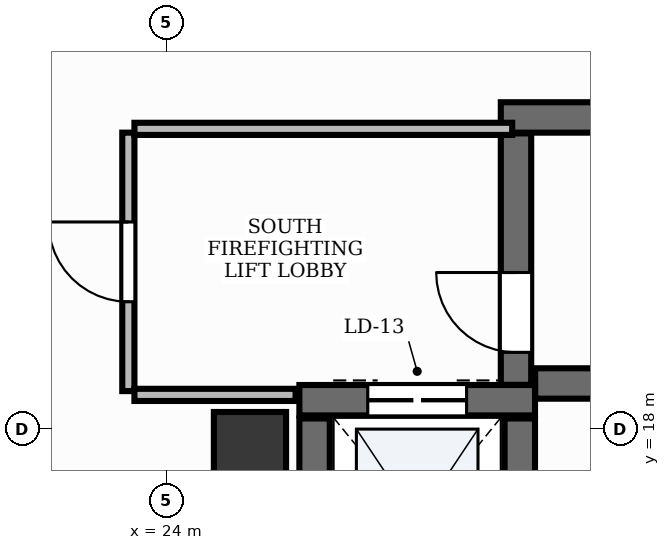
"""IFC4 building model, lengths in metres.
Left out: names, types, materials, properties, quantities, classifications, styles, units other than length and angle.
Written with IfcOpenShell. Run it as: python <this file> out.ifc"""

import sys

from ifc_helpers import new_model, si_unit, direction, frame, frame_2d, origin, origin_2d, place, context, subcontext, project, spatial, rectangle, extrude, element, fill, save


model = new_model("IFC4")
c1 = context("Model", 3, precision=1e-05, world=origin(), true_north=direction((0.0, 1.0)))
c2 = subcontext(c1, "Body", "Model", "MODEL_VIEW")
j1 = project(units=[si_unit("LENGTHUNIT", "METRE"), si_unit("PLANEANGLEUNIT", "RADIAN")], contexts=[c1])
p1 = place(None, origin())
s1 = spatial("IfcSite", under=j1, at=p1, CompositionType="ELEMENT")
p2 = place(p1, origin())
s2 = spatial("IfcBuilding", under=s1, at=p2, CompositionType="ELEMENT")
p3 = place(p2, frame((0.0, 0.0, 179.4)))
s3 = spatial("IfcBuildingStorey", under=s2, at=p3, CompositionType="ELEMENT", Elevation=179.4)
p4 = place(p3, frame((28.852, 18.6, 0.0), z_axis=(0.0, 0.0, 1.0), x_axis=(1.0, 0.0, 0.0)))
e1 = element("IfcWall", 1, at=p4, inside=s3, PredefinedType="SHEAR", context=c2, shape_type="SweptSolid", body=[
    extrude(rectangle(XDim=8.198, YDim=0.4, at=frame_2d((4.099, 0.0))), origin(), (0.0, 0.0, 1.0), 3.9),
])
p5 = place(p3, frame((28.4, 22.1, 0.0), z_axis=(0.0, 0.0, 1.0), x_axis=(1.0, 0.0, 0.0)))
e2 = element("IfcWall", 2, at=p5, inside=s3, PredefinedType="SHEAR", context=c2, shape_type="SweptSolid", body=[
    extrude(rectangle(XDim=8.65, YDim=0.4, at=frame_2d((4.325, 0.0))), origin(), (0.0, 0.0, 1.0), 3.9),
])
p6 = place(p3, frame((28.6, 18.582, 0.0), z_axis=(0.0, 0.0, 1.0), x_axis=(0.0, 1.0, 0.0)))
e3 = element("IfcWall", 3, at=p6, inside=s3, PredefinedType="SHEAR", context=c2, shape_type="SweptSolid", body=[
    extrude(rectangle(XDim=3.308, YDim=0.4, at=frame_2d((1.654, 0.0))), origin(), (0.0, 0.0, 1.0), 3.9),
])
p7 = place(p6, frame((0.428, 0.0, 0.0)))
e4 = element("IfcOpeningElement", 4, at=p7, cuts=e3, PredefinedType="OPENING", context=c2, shape_type="SweptSolid", body=[
    extrude(rectangle(XDim=1.05, YDim=2.15, at=frame_2d((0.525, 1.075))), frame((0.0, 0.215, 0.0), z_axis=(0.0, -1.0, 0.0), x_axis=(1.0, 0.0, 0.0)), (0.0, 0.0, 1.0), 0.43),
])
p8 = place(p3, frame((25.75, 18.38, 0.0), z_axis=(0.0, 0.0, 1.0), x_axis=(1.0, 0.0, 0.0)))
e5 = element("IfcWall", 5, at=p8, inside=s3, PredefinedType="SHEAR", context=c2, shape_type="SweptSolid", body=[
    extrude(rectangle(XDim=3.1, YDim=0.4, at=frame_2d((1.55, 0.0))), origin(), (0.0, 0.0, 1.0), 3.9),
])
p9 = place(p8, frame((0.9, 0.0, 0.0)))
e6 = element("IfcOpeningElement", 6, at=p9, cuts=e5, PredefinedType="OPENING", context=c2, shape_type="SweptSolid", body=[
    extrude(rectangle(XDim=1.3, YDim=2.2, at=frame_2d((0.65, 1.1))), frame((0.0, 0.215, 0.0), z_axis=(0.0, -1.0, 0.0), x_axis=(1.0, 0.0, 0.0)), (0.0, 0.0, 1.0), 0.43),
])
for number, where, z_axis, x_axis in (
    (7, (25.95, 15.44, 0.0), (0.0, 0.0, 1.0), (0.0, 1.0, 0.0)),
    (8, (28.65, 15.44, 0.0), (0.0, 0.0, 1.0), (0.0, 1.0, 0.0)),
):
    element("IfcWall", number, at=place(p3, frame(where, z_axis=z_axis, x_axis=x_axis)), inside=s3, PredefinedType="SHEAR", context=c2, shape_type="SweptSolid", body=[
        extrude(rectangle(XDim=2.7, YDim=0.4, at=frame_2d((1.35, 0.0))), origin(), (0.0, 0.0, 1.0), 3.9),
    ])
p10 = place(p3, frame((25.1, 17.75, -0.0), z_axis=(0.0, 0.0, 1.0), x_axis=(1.0, 0.0, 0.0)))
e9 = element("IfcColumn", 9, at=p10, inside=s3, PredefinedType="PILASTER", context=c2, shape_type="SweptSolid", body=[
    extrude(rectangle(XDim=0.95, YDim=0.95, at=origin_2d()), origin(), (0.0, 0.0, 1.0), 3.901),
])
p11 = place(p3, frame((23.5, 18.5, 0.0), z_axis=(0.0, 0.0, 1.0), x_axis=(0.0, 1.0, 0.0)))
e10 = element("IfcWall", 10, at=p11, inside=s3, PredefinedType="PARTITIONING", context=c2, shape_type="SweptSolid", body=[
    extrude(rectangle(XDim=3.4, YDim=0.16, at=frame_2d((1.7, 0.0))), origin(), (0.0, 0.0, 1.0), 2.91),
])
p12 = place(p11, frame((1.175, 0.0, 0.0)))
e11 = element("IfcOpeningElement", 11, at=p12, cuts=e10, PredefinedType="OPENING", context=c2, shape_type="SweptSolid", body=[
    extrude(rectangle(XDim=1.05, YDim=2.15, at=frame_2d((0.525, 1.075))), frame((0.0, 0.095, 0.0), z_axis=(0.0, -1.0, 0.0), x_axis=(1.0, 0.0, 0.0)), (0.0, 0.0, 1.0), 0.19),
])
p13 = place(p3, frame((23.58, 21.95, 0.0), z_axis=(0.0, 0.0, 1.0), x_axis=(1.0, 0.0, 0.0)))
e12 = element("IfcWall", 12, at=p13, inside=s3, PredefinedType="PARTITIONING", context=c2, shape_type="SweptSolid", body=[
    extrude(rectangle(XDim=4.97, YDim=0.16, at=frame_2d((2.485, 0.0))), origin(), (0.0, 0.0, 1.0), 2.91),
])
p14 = place(p3, frame((23.58, 18.45, 0.0), z_axis=(0.0, 0.0, 1.0), x_axis=(1.0, 0.0, 0.0)))
e13 = element("IfcWall", 13, at=p14, inside=s3, PredefinedType="PARTITIONING", context=c2, shape_type="SweptSolid", body=[
    extrude(rectangle(XDim=2.12, YDim=0.16, at=frame_2d((1.06, 0.0))), origin(), (0.0, 0.0, 1.0), 2.91),
])
p15 = place(p7, origin())
e14 = element("IfcDoor", 14, at=p15, inside=s3, OperationType="SINGLE_SWING_RIGHT", PredefinedType="DOOR", context=c2, shape_type="SweptSolid", body=[
    extrude(rectangle(XDim=1.05, YDim=2.15, at=frame_2d((0.525, 1.075))), frame((0.0, 0.025, 0.0), z_axis=(0.0, -1.0, 0.0), x_axis=(1.0, 0.0, 0.0)), (0.0, 0.0, 1.0), 0.05),
])
fill(e4, e14)
p16 = place(p9, origin())
e15 = element("IfcDoor", 15, at=p16, inside=s3, OperationType="DOUBLE_DOOR_SLIDING", PredefinedType="DOOR", context=c2, shape_type="SweptSolid", body=[
    extrude(rectangle(XDim=1.3, YDim=2.2, at=frame_2d((0.65, 1.1))), frame((0.0, 0.025, 0.0), z_axis=(0.0, -1.0, 0.0), x_axis=(1.0, 0.0, 0.0)), (0.0, 0.0, 1.0), 0.05),
])
fill(e6, e15)
p17 = place(p12, origin())
e16 = element("IfcDoor", 16, at=p17, inside=s3, OperationType="SINGLE_SWING_RIGHT", PredefinedType="DOOR", context=c2, shape_type="SweptSolid", body=[
    extrude(rectangle(XDim=1.05, YDim=2.15, at=frame_2d((0.525, 1.075))), frame((0.0, 0.025, 0.0), z_axis=(0.0, -1.0, 0.0), x_axis=(1.0, 0.0, 0.0)), (0.0, 0.0, 1.0), 0.05),
])
fill(e11, e16)
save(model, sys.argv[1])
